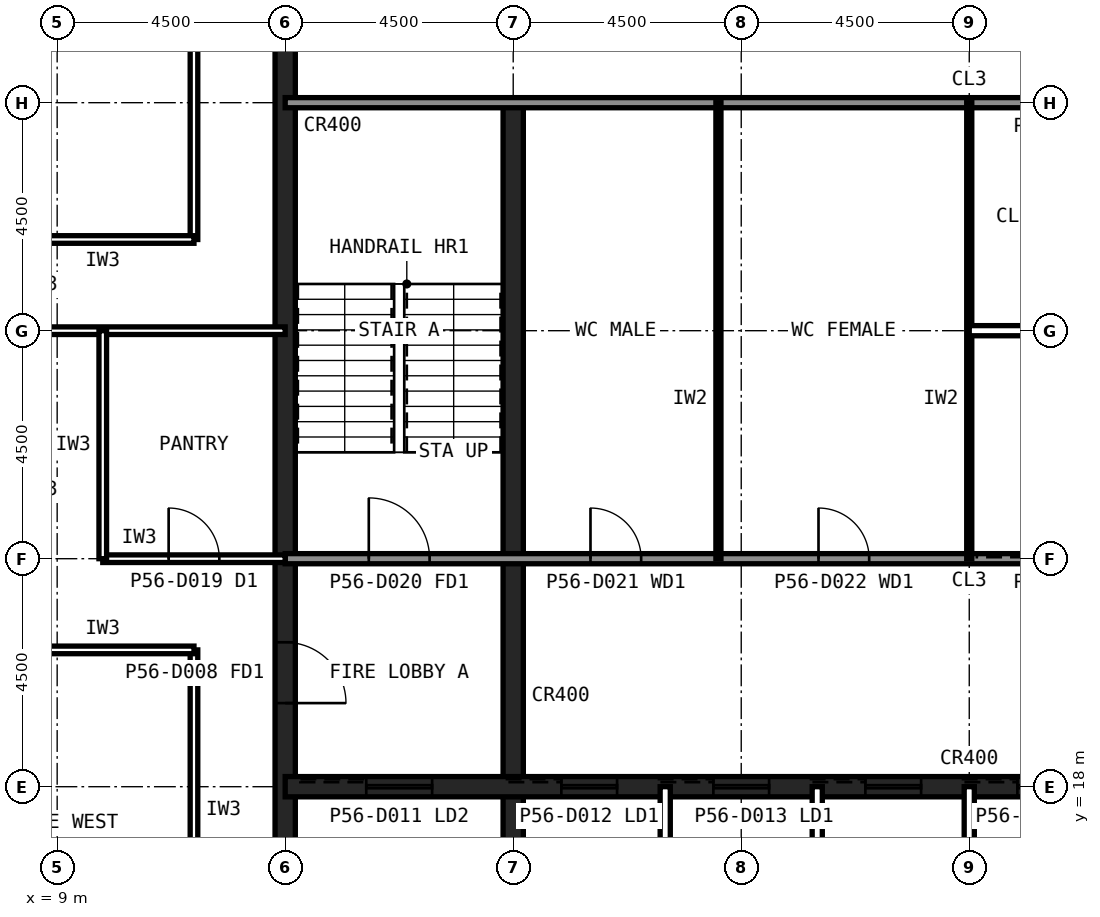
"""IFC4 building model, lengths in metres.
Left out: names, types, materials, properties, quantities, classifications, styles, units other than length and angle.
Written with IfcOpenShell. Run it as: python <this file> out.ifc"""

import sys

from ifc_helpers import new_model, si_unit, direction, frame, frame_2d, origin, place, context, subcontext, project, spatial, rectangle, extrude, element, fill, save


model = new_model("IFC4")
c1 = context("Model", 3, precision=1e-05, world=origin(), true_north=direction((0.0, 1.0)))
c2 = subcontext(c1, "Body", "Model", "MODEL_VIEW")
j1 = project(units=[si_unit("LENGTHUNIT", "METRE"), si_unit("PLANEANGLEUNIT", "RADIAN")], contexts=[c1])
p1 = place(None, origin())
s1 = spatial("IfcSite", under=j1, at=p1, CompositionType="ELEMENT")
p2 = place(p1, origin())
s2 = spatial("IfcBuilding", under=s1, at=p2, CompositionType="ELEMENT")
p3 = place(p2, frame((0.0, 0.0, 238.6)))
s3 = spatial("IfcBuildingStorey", under=s2, at=p3, CompositionType="ELEMENT", Elevation=238.6)
p4 = place(p3, frame((13.5, 40.5, 0.0), z_axis=(0.0, 0.0, 1.0), x_axis=(0.0, -1.0, 0.0)))
e1 = element("IfcWall", 1, at=p4, inside=s3, PredefinedType="SHEAR", context=c2, shape_type="SweptSolid", body=[
    extrude(rectangle(XDim=27.0, YDim=0.4, at=frame_2d((13.5, 0.0))), origin(), (0.0, 0.0, 1.0), 4.0),
])
p5 = place(p4, frame((19.65, 0.0, 0.0)))
e2 = element("IfcOpeningElement", 2, at=p5, cuts=e1, PredefinedType="OPENING", context=c2, shape_type="SweptSolid", body=[
    extrude(rectangle(XDim=1.2, YDim=2.1, at=frame_2d((0.6, 1.05))), frame((0.0, 0.21, 0.0), z_axis=(0.0, -1.0, 0.0), x_axis=(1.0, 0.0, 0.0)), (0.0, 0.0, 1.0), 0.42),
])
p6 = place(p4, frame((5.85, 0.0, 0.0)))
e3 = element("IfcOpeningElement", 3, at=p6, cuts=e1, PredefinedType="OPENING", context=c2, shape_type="SweptSolid", body=[
    extrude(rectangle(XDim=1.8, YDim=2.1, at=frame_2d((0.9, 1.05))), frame((0.0, 0.21, 0.0), z_axis=(0.0, -1.0, 0.0), x_axis=(1.0, 0.0, 0.0)), (0.0, 0.0, 1.0), 0.42),
])
p7 = place(p3, frame((18.0, 13.5, 0.0), z_axis=(0.0, 0.0, 1.0), x_axis=(0.0, 1.0, 0.0)))
e4 = element("IfcWall", 4, at=p7, inside=s3, PredefinedType="SHEAR", context=c2, shape_type="SweptSolid", body=[
    extrude(rectangle(XDim=18.0, YDim=0.4, at=frame_2d((9.0, 0.0))), origin(), (0.0, 0.0, 1.0), 4.0),
])
p8 = place(p3, frame((13.5, 18.0, 0.0), z_axis=(0.0, 0.0, 1.0), x_axis=(1.0, 0.0, 0.0)))
e5 = element("IfcWall", 5, at=p8, inside=s3, PredefinedType="SHEAR", context=c2, shape_type="SweptSolid", body=[
    extrude(rectangle(XDim=27.0, YDim=0.4, at=frame_2d((13.5, 0.0))), origin(), (0.0, 0.0, 1.0), 4.0),
])
p9 = place(p8, frame((24.3, 0.0, 0.0)))
e6 = element("IfcOpeningElement", 6, at=p9, cuts=e5, PredefinedType="OPENING", context=c2, shape_type="SweptSolid", body=[
    extrude(rectangle(XDim=0.9, YDim=2.1, at=frame_2d((0.45, 1.05))), frame((0.0, 0.21, 0.0), z_axis=(0.0, -1.0, 0.0), x_axis=(1.0, 0.0, 0.0)), (0.0, 0.0, 1.0), 0.42),
])
p10 = place(p8, frame((5.45, 0.0, 0.0)))
e7 = element("IfcOpeningElement", 7, at=p10, cuts=e5, PredefinedType="OPENING", context=c2, shape_type="SweptSolid", body=[
    extrude(rectangle(XDim=1.1, YDim=2.1, at=frame_2d((0.55, 1.05))), frame((0.0, 0.21, 0.0), z_axis=(0.0, -1.0, 0.0), x_axis=(1.0, 0.0, 0.0)), (0.0, 0.0, 1.0), 0.42),
])
p11 = place(p8, frame((8.45, 0.0, 0.0)))
e8 = element("IfcOpeningElement", 8, at=p11, cuts=e5, PredefinedType="OPENING", context=c2, shape_type="SweptSolid", body=[
    extrude(rectangle(XDim=1.1, YDim=2.1, at=frame_2d((0.55, 1.05))), frame((0.0, 0.21, 0.0), z_axis=(0.0, -1.0, 0.0), x_axis=(1.0, 0.0, 0.0)), (0.0, 0.0, 1.0), 0.42),
])
p12 = place(p8, frame((11.45, 0.0, 0.0)))
e9 = element("IfcOpeningElement", 9, at=p12, cuts=e5, PredefinedType="OPENING", context=c2, shape_type="SweptSolid", body=[
    extrude(rectangle(XDim=1.1, YDim=2.1, at=frame_2d((0.55, 1.05))), frame((0.0, 0.21, 0.0), z_axis=(0.0, -1.0, 0.0), x_axis=(1.0, 0.0, 0.0)), (0.0, 0.0, 1.0), 0.42),
])
p13 = place(p8, frame((14.45, 0.0, 0.0)))
e10 = element("IfcOpeningElement", 10, at=p13, cuts=e5, PredefinedType="OPENING", context=c2, shape_type="SweptSolid", body=[
    extrude(rectangle(XDim=1.1, YDim=2.1, at=frame_2d((0.55, 1.05))), frame((0.0, 0.21, 0.0), z_axis=(0.0, -1.0, 0.0), x_axis=(1.0, 0.0, 0.0)), (0.0, 0.0, 1.0), 0.42),
])
p14 = place(p8, frame((17.45, 0.0, 0.0)))
e11 = element("IfcOpeningElement", 11, at=p14, cuts=e5, PredefinedType="OPENING", context=c2, shape_type="SweptSolid", body=[
    extrude(rectangle(XDim=1.1, YDim=2.1, at=frame_2d((0.55, 1.05))), frame((0.0, 0.21, 0.0), z_axis=(0.0, -1.0, 0.0), x_axis=(1.0, 0.0, 0.0)), (0.0, 0.0, 1.0), 0.42),
])
p15 = place(p8, frame((20.45, 0.0, 0.0)))
e12 = element("IfcOpeningElement", 12, at=p15, cuts=e5, PredefinedType="OPENING", context=c2, shape_type="SweptSolid", body=[
    extrude(rectangle(XDim=1.1, YDim=2.1, at=frame_2d((0.55, 1.05))), frame((0.0, 0.21, 0.0), z_axis=(0.0, -1.0, 0.0), x_axis=(1.0, 0.0, 0.0)), (0.0, 0.0, 1.0), 0.42),
])
p16 = place(p8, frame((1.6, 0.0, 0.0)))
e13 = element("IfcOpeningElement", 13, at=p16, cuts=e5, PredefinedType="OPENING", context=c2, shape_type="SweptSolid", body=[
    extrude(rectangle(XDim=1.3, YDim=2.2, at=frame_2d((0.65, 1.1))), frame((0.0, 0.21, 0.0), z_axis=(0.0, -1.0, 0.0), x_axis=(1.0, 0.0, 0.0)), (0.0, 0.0, 1.0), 0.42),
])
p17 = place(p3, frame((13.5, 22.5, 0.0), z_axis=(0.0, 0.0, 1.0), x_axis=(1.0, 0.0, 0.0)))
e14 = element("IfcWall", 14, at=p17, inside=s3, PredefinedType="SOLIDWALL", context=c2, shape_type="SweptSolid", body=[
    extrude(rectangle(XDim=27.0, YDim=0.2, at=frame_2d((13.5, 0.0))), origin(), (0.0, 0.0, 1.0), 3.84),
])
p18 = place(p17, frame((1.65, 0.0, 0.0)))
e15 = element("IfcOpeningElement", 15, at=p18, cuts=e14, PredefinedType="OPENING", context=c2, shape_type="SweptSolid", body=[
    extrude(rectangle(XDim=1.2, YDim=2.1, at=frame_2d((0.6, 1.05))), frame((0.0, 0.11, 0.0), z_axis=(0.0, -1.0, 0.0), x_axis=(1.0, 0.0, 0.0)), (0.0, 0.0, 1.0), 0.22),
])
p19 = place(p17, frame((6.025, 0.0, 0.0)))
e16 = element("IfcOpeningElement", 16, at=p19, cuts=e14, PredefinedType="OPENING", context=c2, shape_type="SweptSolid", body=[
    extrude(rectangle(XDim=1.0, YDim=2.1, at=frame_2d((0.5, 1.05))), frame((0.0, 0.11, 0.0), z_axis=(0.0, -1.0, 0.0), x_axis=(1.0, 0.0, 0.0)), (0.0, 0.0, 1.0), 0.22),
])
p20 = place(p17, frame((10.525, 0.0, 0.0)))
e17 = element("IfcOpeningElement", 17, at=p20, cuts=e14, PredefinedType="OPENING", context=c2, shape_type="SweptSolid", body=[
    extrude(rectangle(XDim=1.0, YDim=2.1, at=frame_2d((0.5, 1.05))), frame((0.0, 0.11, 0.0), z_axis=(0.0, -1.0, 0.0), x_axis=(1.0, 0.0, 0.0)), (0.0, 0.0, 1.0), 0.22),
])
p21 = place(p17, frame((19.75, 0.0, 0.0)))
e18 = element("IfcOpeningElement", 18, at=p21, cuts=e14, PredefinedType="OPENING", context=c2, shape_type="SweptSolid", body=[
    extrude(rectangle(XDim=1.0, YDim=2.1, at=frame_2d((0.5, 1.05))), frame((0.0, 0.11, 0.0), z_axis=(0.0, -1.0, 0.0), x_axis=(1.0, 0.0, 0.0)), (0.0, 0.0, 1.0), 0.22),
])
p22 = place(p17, frame((15.05, 0.0, 0.0)))
e19 = element("IfcOpeningElement", 19, at=p22, cuts=e14, PredefinedType="OPENING", context=c2, shape_type="SweptSolid", body=[
    extrude(rectangle(XDim=1.4, YDim=2.4, at=frame_2d((0.7, 1.2))), frame((0.0, 0.11, 0.0), z_axis=(0.0, -1.0, 0.0), x_axis=(1.0, 0.0, 0.0)), (0.0, 0.0, 1.0), 0.22),
])
p23 = place(p3, frame((13.5, 31.5, 0.0), z_axis=(0.0, 0.0, 1.0), x_axis=(1.0, 0.0, 0.0)))
e20 = element("IfcWall", 20, at=p23, inside=s3, PredefinedType="SOLIDWALL", context=c2, shape_type="SweptSolid", body=[
    extrude(rectangle(XDim=27.0, YDim=0.2, at=frame_2d((13.5, 0.0))), origin(), (0.0, 0.0, 1.0), 3.84),
])
p24 = place(p23, frame((24.15, 0.0, 0.0)))
e21 = element("IfcOpeningElement", 21, at=p24, cuts=e20, PredefinedType="OPENING", context=c2, shape_type="SweptSolid", body=[
    extrude(rectangle(XDim=1.2, YDim=2.1, at=frame_2d((0.6, 1.05))), frame((0.0, 0.11, 0.0), z_axis=(0.0, -1.0, 0.0), x_axis=(1.0, 0.0, 0.0)), (0.0, 0.0, 1.0), 0.22),
])
p25 = place(p23, frame((15.3, 0.0, 0.0)))
e22 = element("IfcOpeningElement", 22, at=p25, cuts=e20, PredefinedType="OPENING", context=c2, shape_type="SweptSolid", body=[
    extrude(rectangle(XDim=0.9, YDim=2.1, at=frame_2d((0.45, 1.05))), frame((0.0, 0.11, 0.0), z_axis=(0.0, -1.0, 0.0), x_axis=(1.0, 0.0, 0.0)), (0.0, 0.0, 1.0), 0.22),
])
p26 = place(p23, frame((19.8, 0.0, 0.0)))
e23 = element("IfcOpeningElement", 23, at=p26, cuts=e20, PredefinedType="OPENING", context=c2, shape_type="SweptSolid", body=[
    extrude(rectangle(XDim=0.9, YDim=2.1, at=frame_2d((0.45, 1.05))), frame((0.0, 0.11, 0.0), z_axis=(0.0, -1.0, 0.0), x_axis=(1.0, 0.0, 0.0)), (0.0, 0.0, 1.0), 0.22),
])
for number, where, z_axis, x_axis in (
    (24, (21.0, 13.5, 0.0), (0.0, 0.0, 1.0), (0.0, 1.0, 0.0)),
    (25, (24.0, 13.5, 0.0), (0.0, 0.0, 1.0), (0.0, 1.0, 0.0)),
    (26, (27.0, 13.5, 0.0), (0.0, 0.0, 1.0), (0.0, 1.0, 0.0)),
):
    element("IfcWall", number, at=place(p3, frame(where, z_axis=z_axis, x_axis=x_axis)), inside=s3, PredefinedType="PARTITIONING", context=c2, shape_type="SweptSolid", body=[
        extrude(rectangle(XDim=4.5, YDim=0.2, at=frame_2d((2.25, 0.0))), origin(), (0.0, 0.0, 1.0), 3.84),
    ])
for number, where, z_axis, x_axis in (
    (27, (22.05, 22.5, 0.0), (0.0, 0.0, 1.0), (0.0, 1.0, 0.0)),
    (28, (27.0, 22.5, 0.0), (0.0, 0.0, 1.0), (0.0, 1.0, 0.0)),
):
    element("IfcWall", number, at=place(p3, frame(where, z_axis=z_axis, x_axis=x_axis)), inside=s3, PredefinedType="PLUMBINGWALL", context=c2, shape_type="SweptSolid", body=[
        extrude(rectangle(XDim=9.0, YDim=0.1, at=frame_2d((4.5, 0.0))), origin(), (0.0, 0.0, 1.0), 3.84),
    ])
p27 = place(p3, frame((27.0, 27.0, 0.0), z_axis=(0.0, 0.0, 1.0), x_axis=(1.0, 0.0, 0.0)))
e29 = element("IfcWall", 29, at=p27, inside=s3, PredefinedType="PARTITIONING", context=c2, shape_type="SweptSolid", body=[
    extrude(rectangle(XDim=9.0, YDim=0.2, at=frame_2d((4.5, 0.0))), origin(), (0.0, 0.0, 1.0), 3.84),
])
p28 = place(p3, frame((0.335, 27.0, 0.0), z_axis=(0.0, 0.0, 1.0), x_axis=(1.0, 0.0, 0.0)))
e30 = element("IfcWall", 30, at=p28, inside=s3, PredefinedType="PARTITIONING", context=c2, shape_type="SweptSolid", body=[
    extrude(rectangle(XDim=13.165, YDim=0.15, at=frame_2d((6.583, 0.0))), origin(), (0.0, 0.0, 1.0), 2.989),
])
p29 = place(p3, frame((11.7, 20.7, 0.0), z_axis=(0.0, 0.0, 1.0), x_axis=(0.0, -1.0, 0.0)))
e31 = element("IfcWall", 31, at=p29, inside=s3, PredefinedType="PARTITIONING", context=c2, shape_type="SweptSolid", body=[
    extrude(rectangle(XDim=9.0, YDim=0.15, at=frame_2d((4.5, 0.0))), origin(), (0.0, 0.0, 1.0), 3.84),
])
p30 = place(p29, frame((4.0, 0.0, 0.0)))
e32 = element("IfcOpeningElement", 32, at=p30, cuts=e31, PredefinedType="OPENING", context=c2, shape_type="SweptSolid", body=[
    extrude(rectangle(XDim=1.0, YDim=2.1, at=frame_2d((0.5, 1.05))), frame((0.0, 0.085, 0.0), z_axis=(0.0, -1.0, 0.0), x_axis=(1.0, 0.0, 0.0)), (0.0, 0.0, 1.0), 0.17),
])
p31 = place(p3, frame((8.1, 20.7, 0.0), z_axis=(0.0, 0.0, 1.0), x_axis=(1.0, 0.0, 0.0)))
e33 = element("IfcWall", 33, at=p31, inside=s3, PredefinedType="PARTITIONING", context=c2, shape_type="SweptSolid", body=[
    extrude(rectangle(XDim=3.6, YDim=0.15, at=frame_2d((1.8, 0.0))), origin(), (0.0, 0.0, 1.0), 3.84),
])
p32 = place(p3, frame((11.7, 42.3, 0.0), z_axis=(0.0, 0.0, 1.0), x_axis=(0.0, -1.0, 0.0)))
e34 = element("IfcWall", 34, at=p32, inside=s3, PredefinedType="PARTITIONING", context=c2, shape_type="SweptSolid", body=[
    extrude(rectangle(XDim=13.5, YDim=0.15, at=frame_2d((6.75, 0.0))), origin(), (0.0, 0.0, 1.0), 3.84),
])
p33 = place(p32, frame((6.25, 0.0, 0.0)))
e35 = element("IfcOpeningElement", 35, at=p33, cuts=e34, PredefinedType="OPENING", context=c2, shape_type="SweptSolid", body=[
    extrude(rectangle(XDim=1.0, YDim=2.1, at=frame_2d((0.5, 1.05))), frame((0.0, 0.085, 0.0), z_axis=(0.0, -1.0, 0.0), x_axis=(1.0, 0.0, 0.0)), (0.0, 0.0, 1.0), 0.17),
])
p34 = place(p3, frame((11.7, 28.8, 0.0), z_axis=(0.0, 0.0, 1.0), x_axis=(-1.0, 0.0, 0.0)))
e36 = element("IfcWall", 36, at=p34, inside=s3, PredefinedType="PARTITIONING", context=c2, shape_type="SweptSolid", body=[
    extrude(rectangle(XDim=3.6, YDim=0.15, at=frame_2d((1.8, 0.0))), origin(), (0.0, 0.0, 1.0), 3.84),
])
p35 = place(p3, frame((9.9, 22.5, 0.0), z_axis=(0.0, 0.0, 1.0), x_axis=(1.0, 0.0, 0.0)))
e37 = element("IfcWall", 37, at=p35, inside=s3, PredefinedType="PARTITIONING", context=c2, shape_type="SweptSolid", body=[
    extrude(rectangle(XDim=3.6, YDim=0.15, at=frame_2d((1.8, 0.0))), origin(), (0.0, 0.0, 1.0), 2.989),
])
p36 = place(p35, frame((1.3, 0.0, 0.0)))
e38 = element("IfcOpeningElement", 38, at=p36, cuts=e37, PredefinedType="OPENING", context=c2, shape_type="SweptSolid", body=[
    extrude(rectangle(XDim=1.0, YDim=2.1, at=frame_2d((0.5, 1.05))), frame((0.0, 0.085, 0.0), z_axis=(0.0, -1.0, 0.0), x_axis=(1.0, 0.0, 0.0)), (0.0, 0.0, 1.0), 0.17),
])
p37 = place(p3, frame((9.9, 27.0, 0.0), z_axis=(0.0, 0.0, 1.0), x_axis=(0.0, -1.0, 0.0)))
e39 = element("IfcWall", 39, at=p37, inside=s3, PredefinedType="PARTITIONING", context=c2, shape_type="SweptSolid", body=[
    extrude(rectangle(XDim=4.5, YDim=0.15, at=frame_2d((2.25, 0.0))), origin(), (0.0, 0.0, 1.0), 3.84),
])
p38 = place(p5, origin())
e40 = element("IfcDoor", 40, at=p38, inside=s3, OperationType="SINGLE_SWING_RIGHT", PredefinedType="DOOR", context=c2, shape_type="SweptSolid", body=[
    extrude(rectangle(XDim=1.2, YDim=2.1, at=frame_2d((0.6, 1.05))), frame((0.0, 0.025, 0.0), z_axis=(0.0, -1.0, 0.0), x_axis=(1.0, 0.0, 0.0)), (0.0, 0.0, 1.0), 0.05),
])
fill(e2, e40)
p39 = place(p18, origin())
e41 = element("IfcDoor", 41, at=p39, inside=s3, OperationType="SINGLE_SWING_LEFT", PredefinedType="DOOR", context=c2, shape_type="SweptSolid", body=[
    extrude(rectangle(XDim=1.2, YDim=2.1, at=frame_2d((0.6, 1.05))), frame((0.0, 0.025, 0.0), z_axis=(0.0, -1.0, 0.0), x_axis=(1.0, 0.0, 0.0)), (0.0, 0.0, 1.0), 0.05),
])
fill(e15, e41)
p40 = place(p19, origin())
e42 = element("IfcDoor", 42, at=p40, inside=s3, OperationType="SINGLE_SWING_LEFT", PredefinedType="DOOR", context=c2, shape_type="SweptSolid", body=[
    extrude(rectangle(XDim=1.0, YDim=2.1, at=frame_2d((0.5, 1.05))), frame((0.0, 0.025, 0.0), z_axis=(0.0, -1.0, 0.0), x_axis=(1.0, 0.0, 0.0)), (0.0, 0.0, 1.0), 0.05),
])
fill(e16, e42)
p41 = place(p20, origin())
e43 = element("IfcDoor", 43, at=p41, inside=s3, OperationType="SINGLE_SWING_LEFT", PredefinedType="DOOR", context=c2, shape_type="SweptSolid", body=[
    extrude(rectangle(XDim=1.0, YDim=2.1, at=frame_2d((0.5, 1.05))), frame((0.0, 0.025, 0.0), z_axis=(0.0, -1.0, 0.0), x_axis=(1.0, 0.0, 0.0)), (0.0, 0.0, 1.0), 0.05),
])
fill(e17, e43)
p42 = place(p10, origin())
e44 = element("IfcDoor", 44, at=p42, inside=s3, OperationType="SLIDING_TO_LEFT", PredefinedType="DOOR", context=c2, shape_type="SweptSolid", body=[
    extrude(rectangle(XDim=1.1, YDim=2.1, at=frame_2d((0.55, 1.05))), frame((0.0, 0.025, 0.0), z_axis=(0.0, -1.0, 0.0), x_axis=(1.0, 0.0, 0.0)), (0.0, 0.0, 1.0), 0.05),
])
fill(e7, e44)
p43 = place(p11, origin())
e45 = element("IfcDoor", 45, at=p43, inside=s3, OperationType="SLIDING_TO_LEFT", PredefinedType="DOOR", context=c2, shape_type="SweptSolid", body=[
    extrude(rectangle(XDim=1.1, YDim=2.1, at=frame_2d((0.55, 1.05))), frame((0.0, 0.025, 0.0), z_axis=(0.0, -1.0, 0.0), x_axis=(1.0, 0.0, 0.0)), (0.0, 0.0, 1.0), 0.05),
])
fill(e8, e45)
p44 = place(p12, origin())
e46 = element("IfcDoor", 46, at=p44, inside=s3, OperationType="SLIDING_TO_LEFT", PredefinedType="DOOR", context=c2, shape_type="SweptSolid", body=[
    extrude(rectangle(XDim=1.1, YDim=2.1, at=frame_2d((0.55, 1.05))), frame((0.0, 0.025, 0.0), z_axis=(0.0, -1.0, 0.0), x_axis=(1.0, 0.0, 0.0)), (0.0, 0.0, 1.0), 0.05),
])
fill(e9, e46)
p45 = place(p13, origin())
e47 = element("IfcDoor", 47, at=p45, inside=s3, OperationType="SLIDING_TO_LEFT", PredefinedType="DOOR", context=c2, shape_type="SweptSolid", body=[
    extrude(rectangle(XDim=1.1, YDim=2.1, at=frame_2d((0.55, 1.05))), frame((0.0, 0.025, 0.0), z_axis=(0.0, -1.0, 0.0), x_axis=(1.0, 0.0, 0.0)), (0.0, 0.0, 1.0), 0.05),
])
fill(e10, e47)
p46 = place(p16, origin())
e48 = element("IfcDoor", 48, at=p46, inside=s3, OperationType="SLIDING_TO_LEFT", PredefinedType="DOOR", context=c2, shape_type="SweptSolid", body=[
    extrude(rectangle(XDim=1.3, YDim=2.2, at=frame_2d((0.65, 1.1))), frame((0.0, 0.025, 0.0), z_axis=(0.0, -1.0, 0.0), x_axis=(1.0, 0.0, 0.0)), (0.0, 0.0, 1.0), 0.05),
])
fill(e13, e48)
p47 = place(p36, origin())
e49 = element("IfcDoor", 49, at=p47, inside=s3, OperationType="SINGLE_SWING_LEFT", PredefinedType="DOOR", context=c2, shape_type="SweptSolid", body=[
    extrude(rectangle(XDim=1.0, YDim=2.1, at=frame_2d((0.5, 1.05))), frame((0.0, 0.025, 0.0), z_axis=(0.0, -1.0, 0.0), x_axis=(1.0, 0.0, 0.0)), (0.0, 0.0, 1.0), 0.05),
])
fill(e38, e49)
save(model, sys.argv[1])
